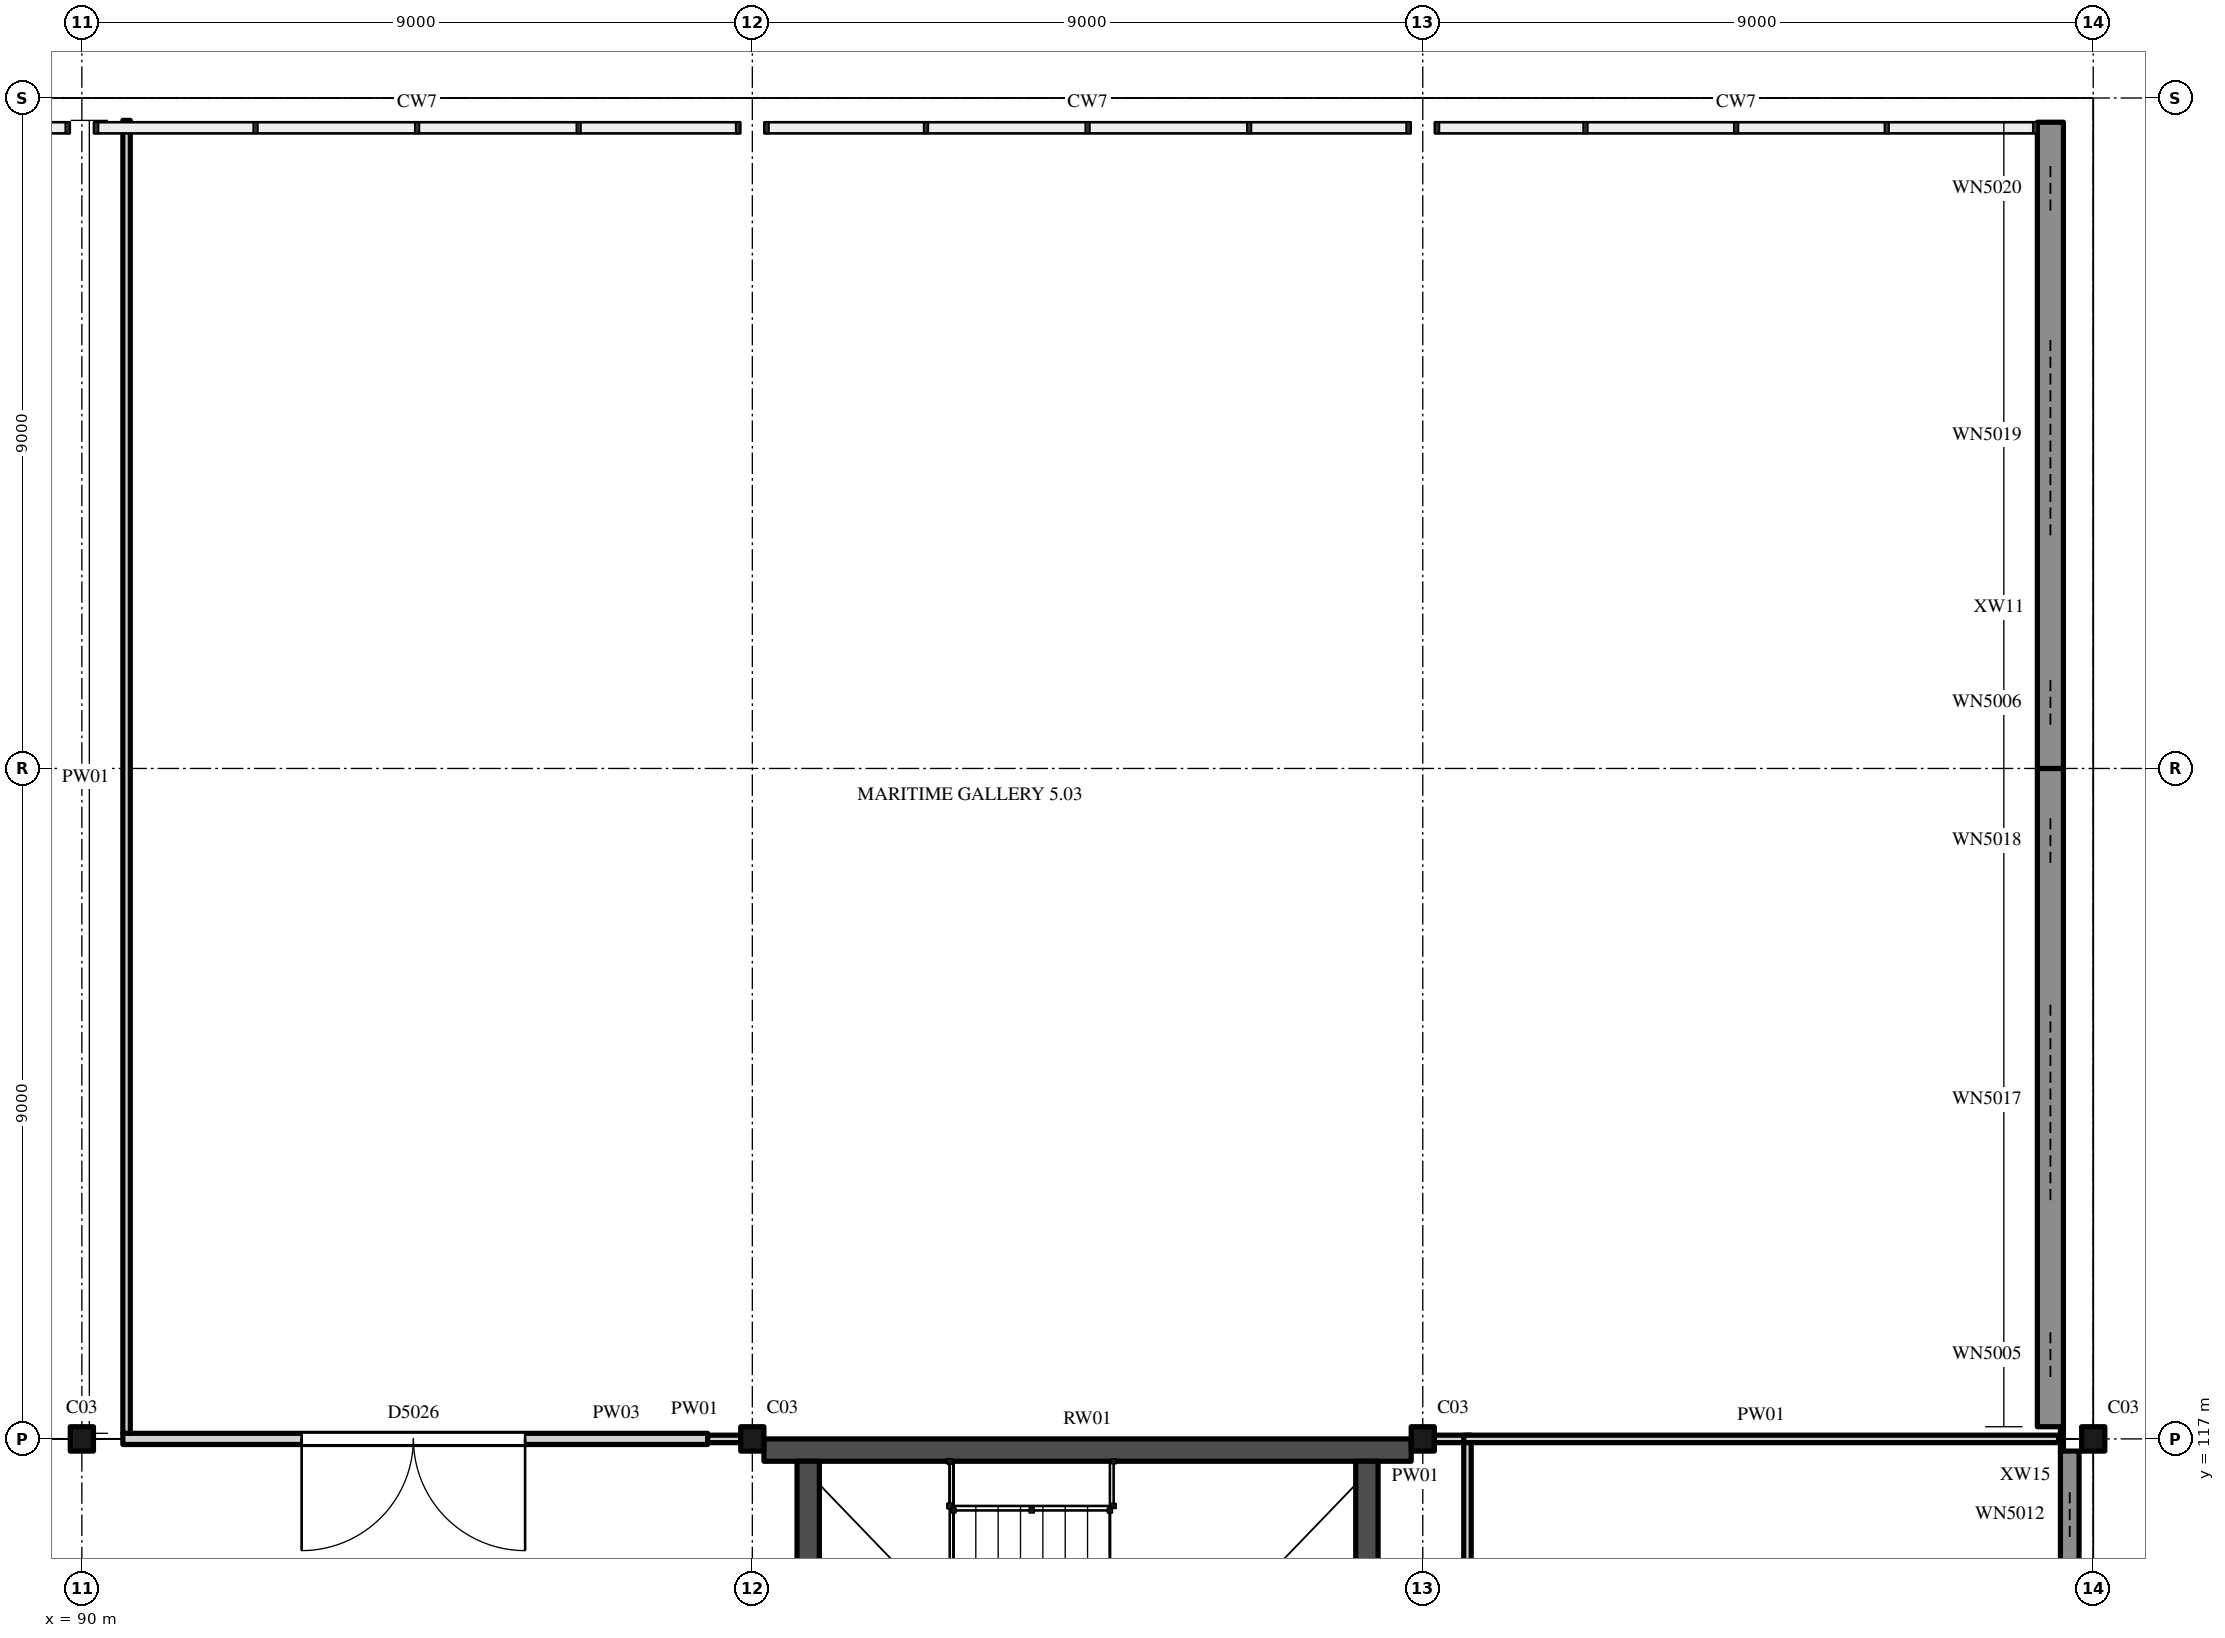
"""IFC4 building model, lengths in metres.
Left out: names, types, materials, properties, quantities, classifications, styles, units other than length and angle.
Written with IfcOpenShell. Run it as: python <this file> out.ifc"""

import sys

from ifc_helpers import new_model, si_unit, direction, frame, frame_2d, origin, origin_2d, place, context, subcontext, project, spatial, rectangle, i_section, extrude, element, fill, save


model = new_model("IFC4")
c1 = context("Model", 3, precision=1e-05, world=origin(), true_north=direction((0.0, 1.0)))
c2 = subcontext(c1, "Body", "Model", "MODEL_VIEW")
j1 = project(units=[si_unit("LENGTHUNIT", "METRE"), si_unit("PLANEANGLEUNIT", "RADIAN")], contexts=[c1])
p1 = place(None, origin())
s1 = spatial("IfcSite", under=j1, at=p1, CompositionType="ELEMENT")
p2 = place(p1, origin())
s2 = spatial("IfcBuilding", under=s1, at=p2, CompositionType="ELEMENT")
p3 = place(p2, frame((0.0, 0.0, 31.0)))
s3 = spatial("IfcBuildingStorey", under=s2, at=p3, CompositionType="ELEMENT", Elevation=31.0)
for number, where, z_axis, x_axis in (
    (1, (90.0, 117.0, 0.0), (0.0, 0.0, 1.0), (1.0, 0.0, 0.0)),
    (2, (99.0, 117.0, 0.0), (0.0, 0.0, 1.0), (1.0, 0.0, 0.0)),
    (3, (108.0, 117.0, 0.0), (0.0, 0.0, 1.0), (1.0, 0.0, 0.0)),
    (4, (117.0, 117.0, 0.0), (0.0, 0.0, 1.0), (1.0, 0.0, 0.0)),
):
    element("IfcColumn", number, at=place(p3, frame(where, z_axis=z_axis, x_axis=x_axis)), inside=s3, PredefinedType="COLUMN", context=c2, shape_type="SweptSolid", body=[
        extrude(i_section(OverallWidth=0.311, OverallDepth=0.327, WebThickness=0.016, FlangeThickness=0.025, FilletRadius=0.017, at=origin_2d()), origin(), (0.0, 0.0, 1.0), 5.0),
    ])
p4 = place(p3, frame((99.156, 116.85, 0.0), z_axis=(0.0, 0.0, 1.0), x_axis=(1.0, 0.0, 0.0)))
e5 = element("IfcWall", 5, at=p4, inside=s3, PredefinedType="SHEAR", context=c2, shape_type="SweptSolid", body=[
    extrude(rectangle(XDim=8.689, YDim=0.3, at=frame_2d((4.344, 0.0))), origin(), (0.0, 0.0, 1.0), 5.0),
])
p5 = place(p3, frame((99.75, 108.9, 0.0), z_axis=(0.0, 0.0, 1.0), x_axis=(0.0, 1.0, 0.0)))
e6 = element("IfcWall", 6, at=p5, inside=s3, PredefinedType="SHEAR", context=c2, shape_type="SweptSolid", body=[
    extrude(rectangle(XDim=7.8, YDim=0.3, at=frame_2d((3.9, 0.0))), origin(), (0.0, 0.0, 1.0), 5.0),
])
p6 = place(p5, frame((4.1, 0.0, 0.0)))
e7 = element("IfcOpeningElement", 7, at=p6, cuts=e6, PredefinedType="OPENING", context=c2, shape_type="SweptSolid", body=[
    extrude(rectangle(XDim=1.2, YDim=2.1, at=frame_2d((0.6, 1.05))), frame((0.0, 0.16, 0.0), z_axis=(0.0, -1.0, 0.0), x_axis=(1.0, 0.0, 0.0)), (0.0, 0.0, 1.0), 0.32),
])
p7 = place(p3, frame((107.25, 108.9, 0.0), z_axis=(0.0, 0.0, 1.0), x_axis=(0.0, 1.0, 0.0)))
e8 = element("IfcWall", 8, at=p7, inside=s3, PredefinedType="SHEAR", context=c2, shape_type="SweptSolid", body=[
    extrude(rectangle(XDim=7.8, YDim=0.3, at=frame_2d((3.9, 0.0))), origin(), (0.0, 0.0, 1.0), 5.0),
])
p8 = place(p3, frame((116.685, 108.161, 0.0), z_axis=(0.0, 0.0, 1.0), x_axis=(0.0, 1.0, 0.0)))
e9 = element("IfcWall", 9, at=p8, inside=s3, PredefinedType="SOLIDWALL", context=c2, shape_type="SweptSolid", body=[
    extrude(rectangle(XDim=8.676, YDim=0.25, at=frame_2d((4.338, 0.0))), origin(), (0.0, 0.0, 1.0), 4.504),
])
p9 = place(p8, frame((0.623, 0.0, 1.6)))
e10 = element("IfcOpeningElement", 10, at=p9, cuts=e9, PredefinedType="OPENING", context=c2, shape_type="SweptSolid", body=[
    extrude(rectangle(XDim=0.6, YDim=1.2, at=frame_2d((0.3, 0.6))), frame((0.0, 0.135, 0.0), z_axis=(0.0, -1.0, 0.0), x_axis=(1.0, 0.0, 0.0)), (0.0, 0.0, 1.0), 0.27),
])
p10 = place(p8, frame((3.017, 0.0, 1.6)))
e11 = element("IfcOpeningElement", 11, at=p10, cuts=e9, PredefinedType="OPENING", context=c2, shape_type="SweptSolid", body=[
    extrude(rectangle(XDim=2.7, YDim=1.2, at=frame_2d((1.35, 0.6))), frame((0.0, 0.135, 0.0), z_axis=(0.0, -1.0, 0.0), x_axis=(1.0, 0.0, 0.0)), (0.0, 0.0, 1.0), 0.27),
])
p11 = place(p8, frame((7.523, 0.0, 1.6)))
e12 = element("IfcOpeningElement", 12, at=p11, cuts=e9, PredefinedType="OPENING", context=c2, shape_type="SweptSolid", body=[
    extrude(rectangle(XDim=0.6, YDim=1.2, at=frame_2d((0.3, 0.6))), frame((0.0, 0.135, 0.0), z_axis=(0.0, -1.0, 0.0), x_axis=(1.0, 0.0, 0.0)), (0.0, 0.0, 1.0), 0.27),
])
p12 = place(p3, frame((116.425, 117.164, 0.0), z_axis=(0.0, 0.0, 1.0), x_axis=(0.0, 1.0, 0.0)))
e13 = element("IfcWall", 13, at=p12, inside=s3, PredefinedType="SOLIDWALL", context=c2, shape_type="SweptSolid", body=[
    extrude(rectangle(XDim=8.836, YDim=0.35, at=frame_2d((4.418, 0.0))), origin(), (0.0, 0.0, 1.0), 4.825),
])
p13 = place(p12, frame((0.668, 0.0, 1.6)))
e14 = element("IfcOpeningElement", 14, at=p13, cuts=e13, PredefinedType="OPENING", context=c2, shape_type="SweptSolid", body=[
    extrude(rectangle(XDim=0.6, YDim=1.2, at=frame_2d((0.3, 0.6))), frame((0.0, 0.185, 0.0), z_axis=(0.0, -1.0, 0.0), x_axis=(1.0, 0.0, 0.0)), (0.0, 0.0, 1.0), 0.37),
])
p14 = place(p12, frame((3.042, 0.0, 1.6)))
e15 = element("IfcOpeningElement", 15, at=p14, cuts=e13, PredefinedType="OPENING", context=c2, shape_type="SweptSolid", body=[
    extrude(rectangle(XDim=2.7, YDim=1.2, at=frame_2d((1.35, 0.6))), frame((0.0, 0.185, 0.0), z_axis=(0.0, -1.0, 0.0), x_axis=(1.0, 0.0, 0.0)), (0.0, 0.0, 1.0), 0.37),
])
p15 = place(p12, frame((7.568, 0.0, 1.6)))
e16 = element("IfcOpeningElement", 16, at=p15, cuts=e13, PredefinedType="OPENING", context=c2, shape_type="SweptSolid", body=[
    extrude(rectangle(XDim=0.6, YDim=1.2, at=frame_2d((0.3, 0.6))), frame((0.0, 0.185, 0.0), z_axis=(0.0, -1.0, 0.0), x_axis=(1.0, 0.0, 0.0)), (0.0, 0.0, 1.0), 0.37),
])
p16 = place(p3, frame((116.425, 126.0, 0.0), z_axis=(0.0, 0.0, 1.0), x_axis=(0.0, 1.0, 0.0)))
e17 = element("IfcWall", 17, at=p16, inside=s3, PredefinedType="SOLIDWALL", context=c2, shape_type="SweptSolid", body=[
    extrude(rectangle(XDim=8.675, YDim=0.35, at=frame_2d((4.337, 0.0))), origin(), (0.0, 0.0, 1.0), 4.825),
])
p17 = place(p16, frame((0.587, 0.0, 1.6)))
e18 = element("IfcOpeningElement", 18, at=p17, cuts=e17, PredefinedType="OPENING", context=c2, shape_type="SweptSolid", body=[
    extrude(rectangle(XDim=0.6, YDim=1.2, at=frame_2d((0.3, 0.6))), frame((0.0, 0.185, 0.0), z_axis=(0.0, -1.0, 0.0), x_axis=(1.0, 0.0, 0.0)), (0.0, 0.0, 1.0), 0.37),
])
p18 = place(p16, frame((3.128, 0.0, 1.6)))
e19 = element("IfcOpeningElement", 19, at=p18, cuts=e17, PredefinedType="OPENING", context=c2, shape_type="SweptSolid", body=[
    extrude(rectangle(XDim=2.7, YDim=1.2, at=frame_2d((1.35, 0.6))), frame((0.0, 0.185, 0.0), z_axis=(0.0, -1.0, 0.0), x_axis=(1.0, 0.0, 0.0)), (0.0, 0.0, 1.0), 0.37),
])
p19 = place(p16, frame((7.488, 0.0, 1.6)))
e20 = element("IfcOpeningElement", 20, at=p19, cuts=e17, PredefinedType="OPENING", context=c2, shape_type="SweptSolid", body=[
    extrude(rectangle(XDim=0.6, YDim=1.2, at=frame_2d((0.3, 0.6))), frame((0.0, 0.185, 0.0), z_axis=(0.0, -1.0, 0.0), x_axis=(1.0, 0.0, 0.0)), (0.0, 0.0, 1.0), 0.37),
])
p20 = place(p3, frame((116.58, 116.836, 0.0), z_axis=(0.0, 0.0, 1.0), x_axis=(0.0, 1.0, 0.0)))
e21 = element("IfcWall", 21, at=p20, inside=s3, PredefinedType="SOLIDWALL", context=c2, shape_type="SweptSolid", body=[
    extrude(rectangle(XDim=0.327, YDim=0.04, at=frame_2d((0.164, 0.0))), origin(), (0.0, 0.0, 1.0), 4.825),
])
p21 = place(p3, frame((90.55, 117.0, 0.0), z_axis=(0.0, 0.0, 1.0), x_axis=(1.0, 0.0, 0.0)))
e22 = element("IfcWall", 22, at=p21, inside=s3, PredefinedType="PARTITIONING", context=c2, shape_type="SweptSolid", body=[
    extrude(rectangle(XDim=7.85, YDim=0.15, at=frame_2d((3.925, 0.0))), origin(), (0.0, 0.0, 1.0), 4.518),
])
p22 = place(p21, frame((2.4, 0.0, 0.0)))
e23 = element("IfcOpeningElement", 23, at=p22, cuts=e22, PredefinedType="OPENING", context=c2, shape_type="SweptSolid", body=[
    extrude(rectangle(XDim=3.0, YDim=3.0, at=frame_2d((1.5, 1.5))), frame((0.0, 0.085, 0.0), z_axis=(0.0, -1.0, 0.0), x_axis=(1.0, 0.0, 0.0)), (0.0, 0.0, 1.0), 0.17),
])
p23 = place(p3, frame((98.4, 117.0, 0.0), z_axis=(0.0, 0.0, 1.0), x_axis=(1.0, 0.0, 0.0)))
e24 = element("IfcWall", 24, at=p23, inside=s3, PredefinedType="PARTITIONING", context=c2, shape_type="SweptSolid", body=[
    extrude(rectangle(XDim=0.444, YDim=0.1, at=frame_2d((0.222, 0.0))), origin(), (0.0, 0.0, 1.0), 4.825),
])
p24 = place(p3, frame((108.156, 117.0, 0.0), z_axis=(0.0, 0.0, 1.0), x_axis=(1.0, 0.0, 0.0)))
e25 = element("IfcWall", 25, at=p24, inside=s3, PredefinedType="PARTITIONING", context=c2, shape_type="SweptSolid", body=[
    extrude(rectangle(XDim=0.494, YDim=0.1, at=frame_2d((0.247, 0.0))), origin(), (0.0, 0.0, 1.0), 4.825),
])
p25 = place(p3, frame((108.55, 117.0, 0.0), z_axis=(0.0, 0.0, 1.0), x_axis=(1.0, 0.0, 0.0)))
e26 = element("IfcWall", 26, at=p25, inside=s3, PredefinedType="PARTITIONING", context=c2, shape_type="SweptSolid", body=[
    extrude(rectangle(XDim=7.985, YDim=0.1, at=frame_2d((3.992, 0.0))), origin(), (0.0, 0.0, 1.0), 4.518),
])
p26 = place(p3, frame((90.6, 117.075, 0.0), z_axis=(0.0, 0.0, 1.0), x_axis=(0.0, 1.0, 0.0)))
e27 = element("IfcWall", 27, at=p26, inside=s3, PredefinedType="PARTITIONING", context=c2, shape_type="SweptSolid", body=[
    extrude(rectangle(XDim=17.625, YDim=0.1, at=frame_2d((8.812, 0.0))), origin(), (0.0, 0.0, 1.0), 4.825),
])
p27 = place(p3, frame((108.6, 108.062, 0.0), z_axis=(0.0, 0.0, 1.0), x_axis=(0.0, 1.0, 0.0)))
e28 = element("IfcWall", 28, at=p27, inside=s3, PredefinedType="PARTITIONING", context=c2, shape_type="SweptSolid", body=[
    extrude(rectangle(XDim=8.887, YDim=0.1, at=frame_2d((4.444, 0.0))), origin(), (0.0, 0.0, 1.0), 4.825),
])
p28 = place(p11, origin())
e29 = element("IfcWindow", 29, at=p28, inside=s3, PartitioningType="SINGLE_PANEL", PredefinedType="WINDOW", context=c2, shape_type="SweptSolid", body=[
    extrude(rectangle(XDim=0.6, YDim=1.2, at=frame_2d((0.3, 0.6))), frame((0.0, 0.03, 0.0), z_axis=(0.0, -1.0, 0.0), x_axis=(1.0, 0.0, 0.0)), (0.0, 0.0, 1.0), 0.06),
])
fill(e12, e29)
p29 = place(p13, origin())
e30 = element("IfcWindow", 30, at=p29, inside=s3, PartitioningType="SINGLE_PANEL", PredefinedType="WINDOW", context=c2, shape_type="SweptSolid", body=[
    extrude(rectangle(XDim=0.6, YDim=1.2, at=frame_2d((0.3, 0.6))), frame((0.0, 0.03, 0.0), z_axis=(0.0, -1.0, 0.0), x_axis=(1.0, 0.0, 0.0)), (0.0, 0.0, 1.0), 0.06),
])
fill(e14, e30)
p30 = place(p14, origin())
e31 = element("IfcWindow", 31, at=p30, inside=s3, PartitioningType="SINGLE_PANEL", PredefinedType="WINDOW", context=c2, shape_type="SweptSolid", body=[
    extrude(rectangle(XDim=2.7, YDim=1.2, at=frame_2d((1.35, 0.6))), frame((0.0, 0.03, 0.0), z_axis=(0.0, -1.0, 0.0), x_axis=(1.0, 0.0, 0.0)), (0.0, 0.0, 1.0), 0.06),
])
fill(e15, e31)
p31 = place(p15, origin())
e32 = element("IfcWindow", 32, at=p31, inside=s3, PartitioningType="SINGLE_PANEL", PredefinedType="WINDOW", context=c2, shape_type="SweptSolid", body=[
    extrude(rectangle(XDim=0.6, YDim=1.2, at=frame_2d((0.3, 0.6))), frame((0.0, 0.03, 0.0), z_axis=(0.0, -1.0, 0.0), x_axis=(1.0, 0.0, 0.0)), (0.0, 0.0, 1.0), 0.06),
])
fill(e16, e32)
p32 = place(p17, origin())
e33 = element("IfcWindow", 33, at=p32, inside=s3, PartitioningType="SINGLE_PANEL", PredefinedType="WINDOW", context=c2, shape_type="SweptSolid", body=[
    extrude(rectangle(XDim=0.6, YDim=1.2, at=frame_2d((0.3, 0.6))), frame((0.0, 0.03, 0.0), z_axis=(0.0, -1.0, 0.0), x_axis=(1.0, 0.0, 0.0)), (0.0, 0.0, 1.0), 0.06),
])
fill(e18, e33)
p33 = place(p18, origin())
e34 = element("IfcWindow", 34, at=p33, inside=s3, PartitioningType="SINGLE_PANEL", PredefinedType="WINDOW", context=c2, shape_type="SweptSolid", body=[
    extrude(rectangle(XDim=2.7, YDim=1.2, at=frame_2d((1.35, 0.6))), frame((0.0, 0.03, 0.0), z_axis=(0.0, -1.0, 0.0), x_axis=(1.0, 0.0, 0.0)), (0.0, 0.0, 1.0), 0.06),
])
fill(e19, e34)
p34 = place(p19, origin())
e35 = element("IfcWindow", 35, at=p34, inside=s3, PartitioningType="SINGLE_PANEL", PredefinedType="WINDOW", context=c2, shape_type="SweptSolid", body=[
    extrude(rectangle(XDim=0.6, YDim=1.2, at=frame_2d((0.3, 0.6))), frame((0.0, 0.03, 0.0), z_axis=(0.0, -1.0, 0.0), x_axis=(1.0, 0.0, 0.0)), (0.0, 0.0, 1.0), 0.06),
])
fill(e20, e35)
p35 = place(p22, origin())
e36 = element("IfcDoor", 36, at=p35, inside=s3, OperationType="DOUBLE_DOOR_SINGLE_SWING", PredefinedType="DOOR", context=c2, shape_type="SweptSolid", body=[
    extrude(rectangle(XDim=3.0, YDim=3.0, at=frame_2d((1.5, 1.5))), frame((0.0, 0.025, 0.0), z_axis=(0.0, -1.0, 0.0), x_axis=(1.0, 0.0, 0.0)), (0.0, 0.0, 1.0), 0.05),
])
fill(e23, e36)
save(model, sys.argv[1])
